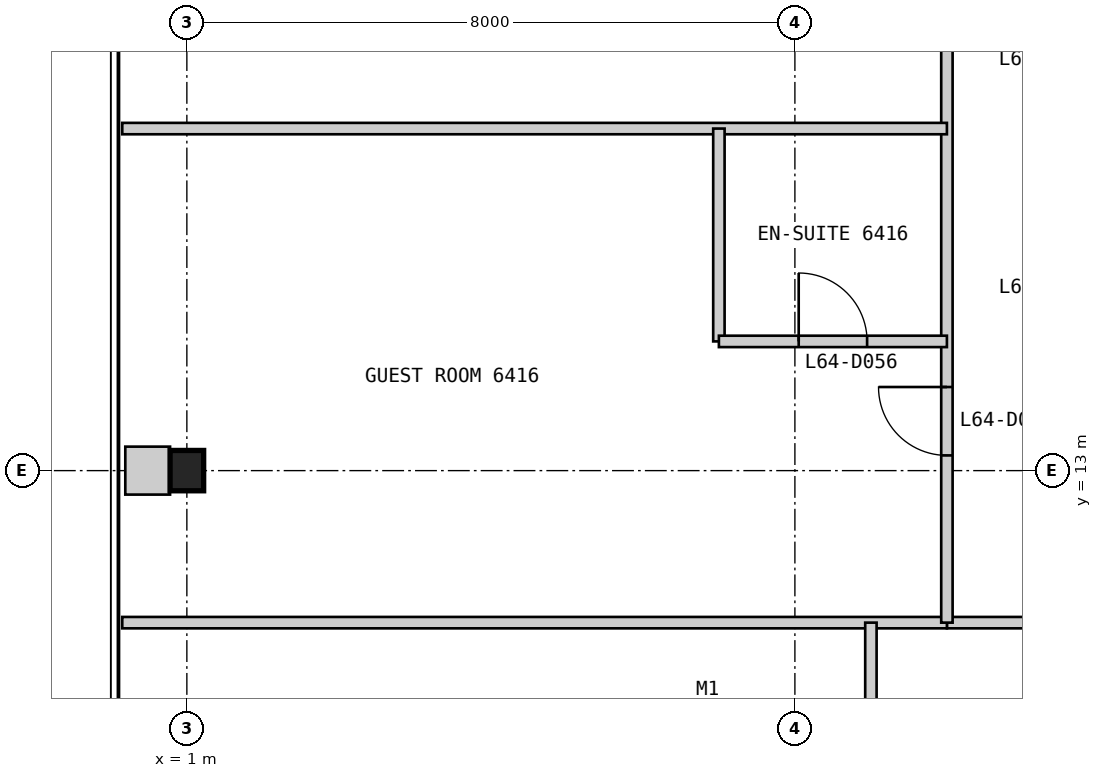
"""IFC4 building model, lengths in metres.
Left out: names, types, materials, properties, quantities, classifications, styles, units other than length and angle.
Written with IfcOpenShell. Run it as: python <this file> out.ifc"""

import sys

from ifc_helpers import new_model, si_unit, direction, frame, frame_2d, origin, origin_2d, place, context, subcontext, project, spatial, rectangle, i_section, extrude, element, fill, save


model = new_model("IFC4")
c1 = context("Model", 3, precision=1e-05, world=origin(), true_north=direction((0.0, 1.0)))
c2 = subcontext(c1, "Body", "Model", "MODEL_VIEW")
j1 = project(units=[si_unit("LENGTHUNIT", "METRE"), si_unit("PLANEANGLEUNIT", "RADIAN")], contexts=[c1])
p1 = place(None, origin())
s1 = spatial("IfcSite", under=j1, at=p1, CompositionType="ELEMENT")
p2 = place(p1, origin())
s2 = spatial("IfcBuilding", under=s1, at=p2, CompositionType="ELEMENT")
p3 = place(p2, frame((0.0, 0.0, 269.6)))
s3 = spatial("IfcBuildingStorey", under=s2, at=p3, CompositionType="ELEMENT", Elevation=269.6)
p4 = place(p3, frame((1.0, 13.0, 0.0), z_axis=(0.0, 0.0, 1.0), x_axis=(1.0, 0.0, 0.0)))
e1 = element("IfcColumn", 1, at=p4, inside=s3, PredefinedType="COLUMN", context=c2, shape_type="SweptSolid", body=[
    extrude(i_section(OverallWidth=0.442, OverallDepth=0.531, WebThickness=0.066, FlangeThickness=0.106, at=origin_2d()), origin(), (0.0, 0.0, 1.0), 3.4),
])
p5 = place(p3, frame((11.0, 11.0, 0.0), z_axis=(0.0, 0.0, 1.0), x_axis=(1.0, 0.0, 0.0)))
e2 = element("IfcWall", 2, at=p5, inside=s3, PredefinedType="PARTITIONING", context=c2, shape_type="SweptSolid", body=[
    extrude(rectangle(XDim=28.0, YDim=0.15, at=frame_2d((14.0, 0.0))), origin(), (0.0, 0.0, 1.0), 2.844),
])
p6 = place(p5, frame((1.9, 0.0, 0.0)))
e3 = element("IfcOpeningElement", 3, at=p6, cuts=e2, PredefinedType="OPENING", context=c2, shape_type="SweptSolid", body=[
    extrude(rectangle(XDim=0.9, YDim=2.1, at=frame_2d((0.45, 1.05))), frame((0.0, 0.085, 0.0), z_axis=(0.0, -1.0, 0.0), x_axis=(1.0, 0.0, 0.0)), (0.0, 0.0, 1.0), 0.17),
])
p7 = place(p5, frame((4.7, 0.0, 0.0)))
e4 = element("IfcOpeningElement", 4, at=p7, cuts=e2, PredefinedType="OPENING", context=c2, shape_type="SweptSolid", body=[
    extrude(rectangle(XDim=1.0, YDim=2.1, at=frame_2d((0.5, 1.05))), frame((0.0, 0.085, 0.0), z_axis=(0.0, -1.0, 0.0), x_axis=(1.0, 0.0, 0.0)), (0.0, 0.0, 1.0), 0.17),
])
p8 = place(p5, frame((13.3, 0.0, 0.0)))
e5 = element("IfcOpeningElement", 5, at=p8, cuts=e2, PredefinedType="OPENING", context=c2, shape_type="SweptSolid", body=[
    extrude(rectangle(XDim=0.9, YDim=2.1, at=frame_2d((0.45, 1.05))), frame((0.0, 0.085, 0.0), z_axis=(0.0, -1.0, 0.0), x_axis=(1.0, 0.0, 0.0)), (0.0, 0.0, 1.0), 0.17),
])
p9 = place(p5, frame((24.9, 0.0, 0.0)))
e6 = element("IfcOpeningElement", 6, at=p9, cuts=e2, PredefinedType="OPENING", context=c2, shape_type="SweptSolid", body=[
    extrude(rectangle(XDim=0.9, YDim=2.1, at=frame_2d((0.45, 1.05))), frame((0.0, 0.085, 0.0), z_axis=(0.0, -1.0, 0.0), x_axis=(1.0, 0.0, 0.0)), (0.0, 0.0, 1.0), 0.17),
])
p10 = place(p3, frame((0.15, 11.0, 0.0), z_axis=(0.0, 0.0, 1.0), x_axis=(1.0, 0.0, 0.0)))
e7 = element("IfcWall", 7, at=p10, inside=s3, PredefinedType="PARTITIONING", context=c2, shape_type="SweptSolid", body=[
    extrude(rectangle(XDim=10.85, YDim=0.15, at=frame_2d((5.425, 0.0))), origin(), (0.0, 0.0, 1.0), 2.844),
])
p11 = place(p3, frame((10.0, 8.4, 0.0), z_axis=(0.0, 0.0, 1.0), x_axis=(0.0, 1.0, 0.0)))
e8 = element("IfcWall", 8, at=p11, inside=s3, PredefinedType="PARTITIONING", context=c2, shape_type="SweptSolid", body=[
    extrude(rectangle(XDim=2.6, YDim=0.15, at=frame_2d((1.3, 0.0))), origin(), (0.0, 0.0, 1.0), 3.25),
])
p12 = place(p3, frame((11.0, 39.0, 0.0), z_axis=(0.0, 0.0, 1.0), x_axis=(0.0, -1.0, 0.0)))
e9 = element("IfcWall", 9, at=p12, inside=s3, PredefinedType="PARTITIONING", context=c2, shape_type="SweptSolid", body=[
    extrude(rectangle(XDim=28.0, YDim=0.15, at=frame_2d((14.0, 0.0))), origin(), (0.0, 0.0, 1.0), 2.844),
])
p13 = place(p12, frame((2.075, 0.0, 0.0)))
e10 = element("IfcOpeningElement", 10, at=p13, cuts=e9, PredefinedType="OPENING", context=c2, shape_type="SweptSolid", body=[
    extrude(rectangle(XDim=0.9, YDim=2.1, at=frame_2d((0.45, 1.05))), frame((0.0, 0.085, 0.0), z_axis=(0.0, -1.0, 0.0), x_axis=(1.0, 0.0, 0.0)), (0.0, 0.0, 1.0), 0.17),
])
p14 = place(p12, frame((5.2, 0.0, 0.0)))
e11 = element("IfcOpeningElement", 11, at=p14, cuts=e9, PredefinedType="OPENING", context=c2, shape_type="SweptSolid", body=[
    extrude(rectangle(XDim=0.9, YDim=2.1, at=frame_2d((0.45, 1.05))), frame((0.0, 0.085, 0.0), z_axis=(0.0, -1.0, 0.0), x_axis=(1.0, 0.0, 0.0)), (0.0, 0.0, 1.0), 0.17),
])
p15 = place(p12, frame((13.3, 0.0, 0.0)))
e12 = element("IfcOpeningElement", 12, at=p15, cuts=e9, PredefinedType="OPENING", context=c2, shape_type="SweptSolid", body=[
    extrude(rectangle(XDim=0.9, YDim=2.1, at=frame_2d((0.45, 1.05))), frame((0.0, 0.085, 0.0), z_axis=(0.0, -1.0, 0.0), x_axis=(1.0, 0.0, 0.0)), (0.0, 0.0, 1.0), 0.17),
])
p16 = place(p12, frame((24.9, 0.0, 0.0)))
e13 = element("IfcOpeningElement", 13, at=p16, cuts=e9, PredefinedType="OPENING", context=c2, shape_type="SweptSolid", body=[
    extrude(rectangle(XDim=0.9, YDim=2.1, at=frame_2d((0.45, 1.05))), frame((0.0, 0.085, 0.0), z_axis=(0.0, -1.0, 0.0), x_axis=(1.0, 0.0, 0.0)), (0.0, 0.0, 1.0), 0.17),
])
p17 = place(p3, frame((0.15, 17.5, 0.0), z_axis=(0.0, 0.0, 1.0), x_axis=(1.0, 0.0, 0.0)))
e14 = element("IfcWall", 14, at=p17, inside=s3, PredefinedType="PARTITIONING", context=c2, shape_type="SweptSolid", body=[
    extrude(rectangle(XDim=10.85, YDim=0.15, at=frame_2d((5.425, 0.0))), origin(), (0.0, 0.0, 1.0), 3.25),
])
p18 = place(p3, frame((8.0, 17.5, 0.0), z_axis=(0.0, 0.0, 1.0), x_axis=(0.0, -1.0, 0.0)))
e15 = element("IfcWall", 15, at=p18, inside=s3, PredefinedType="PARTITIONING", context=c2, shape_type="SweptSolid", body=[
    extrude(rectangle(XDim=2.8, YDim=0.15, at=frame_2d((1.4, 0.0))), origin(), (0.0, 0.0, 1.0), 3.25),
])
p19 = place(p3, frame((8.0, 14.7, 0.0), z_axis=(0.0, 0.0, 1.0), x_axis=(1.0, 0.0, 0.0)))
e16 = element("IfcWall", 16, at=p19, inside=s3, PredefinedType="PARTITIONING", context=c2, shape_type="SweptSolid", body=[
    extrude(rectangle(XDim=3.0, YDim=0.15, at=frame_2d((1.5, 0.0))), origin(), (0.0, 0.0, 1.0), 3.25),
])
p20 = place(p19, frame((1.05, 0.0, 0.0)))
e17 = element("IfcOpeningElement", 17, at=p20, cuts=e16, PredefinedType="OPENING", context=c2, shape_type="SweptSolid", body=[
    extrude(rectangle(XDim=0.9, YDim=2.1, at=frame_2d((0.45, 1.05))), frame((0.0, 0.085, 0.0), z_axis=(0.0, -1.0, 0.0), x_axis=(1.0, 0.0, 0.0)), (0.0, 0.0, 1.0), 0.17),
])
p21 = place(p3, frame((0.19, 13.0, 0.0), z_axis=(0.0, 0.0, 1.0), x_axis=(1.0, 0.0, 0.0)))
e18 = element("IfcWall", 18, at=p21, inside=s3, PredefinedType="PARTITIONING", context=c2, shape_type="SweptSolid", body=[
    extrude(rectangle(XDim=0.589, YDim=0.631, at=frame_2d((0.294, 0.0))), origin(), (0.0, 0.0, 1.0), 3.25),
])
p22 = place(p20, origin())
e19 = element("IfcDoor", 19, at=p22, inside=s3, OperationType="SINGLE_SWING_LEFT", PredefinedType="DOOR", context=c2, shape_type="SweptSolid", body=[
    extrude(rectangle(XDim=0.9, YDim=2.1, at=frame_2d((0.45, 1.05))), frame((0.0, 0.025, 0.0), z_axis=(0.0, -1.0, 0.0), x_axis=(1.0, 0.0, 0.0)), (0.0, 0.0, 1.0), 0.05),
])
fill(e17, e19)
p23 = place(p16, frame((0.9, 0.0, 0.0), z_axis=(0.0, 0.0, 1.0), x_axis=(-1.0, 0.0, 0.0)))
e20 = element("IfcDoor", 20, at=p23, inside=s3, OperationType="SINGLE_SWING_RIGHT", PredefinedType="DOOR", context=c2, shape_type="SweptSolid", body=[
    extrude(rectangle(XDim=0.9, YDim=2.1, at=frame_2d((0.45, 1.05))), frame((0.0, 0.025, 0.0), z_axis=(0.0, -1.0, 0.0), x_axis=(1.0, 0.0, 0.0)), (0.0, 0.0, 1.0), 0.05),
])
fill(e13, e20)
save(model, sys.argv[1])
